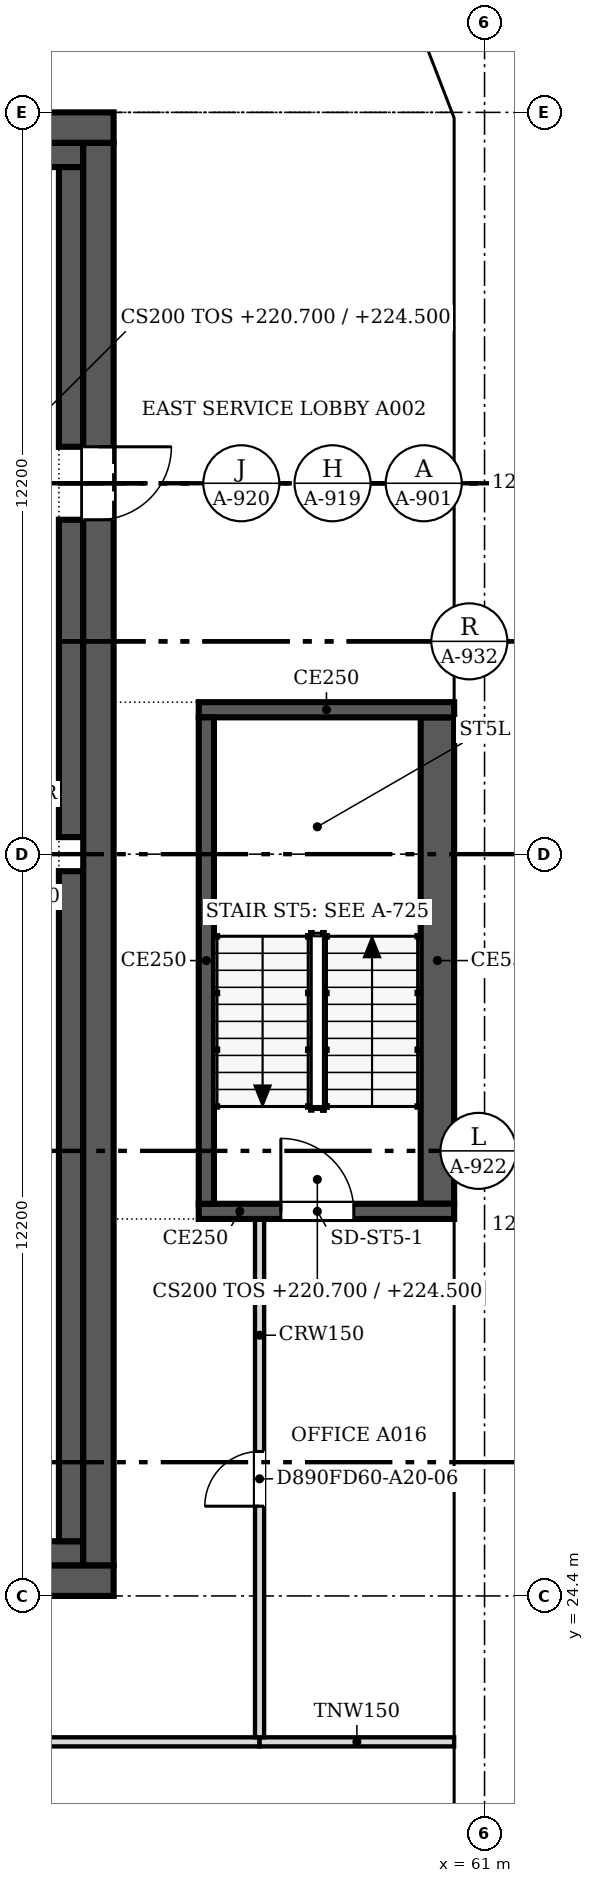
"""IFC4 building model, lengths in metres.
Left out: names, types, materials, properties, quantities, classifications, styles, units other than length and angle.
Written with IfcOpenShell. Run it as: python <this file> out.ifc"""

import sys

from ifc_helpers import new_model, si_unit, direction, frame, frame_2d, origin, place, context, subcontext, project, spatial, polyline, rectangle, outline, extrude, faceted_brep, source, transform, mapped, element, fill, save


model = new_model("IFC4")
c1 = context("Model", 3, precision=1e-05, world=origin(), true_north=direction((0.0, 1.0)))
c2 = subcontext(c1, "Body", "Model", "MODEL_VIEW")
j1 = project(units=[si_unit("LENGTHUNIT", "METRE"), si_unit("PLANEANGLEUNIT", "RADIAN")], contexts=[c1])
p1 = place(None, origin())
s1 = spatial("IfcSite", under=j1, at=p1, CompositionType="ELEMENT")
p2 = place(p1, origin())
s2 = spatial("IfcBuilding", under=s1, at=p2, CompositionType="ELEMENT")
p3 = place(p2, frame((0.0, 0.0, 220.7)))
s3 = spatial("IfcBuildingStorey", under=s2, at=p3, CompositionType="ELEMENT", Elevation=220.7)
m1 = source(origin(), c2, "Body", "Brep", [
    faceted_brep([(3.05, -0.25, 0.0), (6.1, -0.25, 3.8), (6.1, -0.25, 3.8), (3.05, -0.25, 7.6), (0.0, -0.25, 3.8), (0.0, 0.25, 3.8), (3.05, 0.25, 7.6), (6.1, 0.25, 3.8), (6.1, 0.25, 3.8), (3.05, 0.25, 0.0)], [[[0, 1, 2, 3, 4]], [[5, 6, 7, 8, 9]], [[9, 8, 1, 0]], [[7, 6, 3, 2]], [[6, 5, 4, 3]], [[5, 9, 0, 4]], [[1, 8, 7, 2]]]),
])
p4 = place(p3, frame((60.75, 18.3, -3.8), z_axis=(0.0, 0.0, 1.0), x_axis=(0.0, 1.0, 0.0)))
e1 = element("IfcWall", 1, at=p4, inside=s3, PredefinedType="SOLIDWALL", context=c2, shape_type="MappedRepresentation", body=[
    mapped(m1, transform((0.0, 0.0, 0.0), scale=1.0)),
])
m2 = source(origin(), c2, "Body", "SweptSolid", [
    extrude(outline(polyline([(3.05, 0.399), (5.78, 3.8), (3.05, 7.201), (0.321, 3.8), (3.05, 0.399)])), frame((0.0, 0.26, 0.0), z_axis=(0.0, -1.0, 0.0), x_axis=(1.0, 0.0, 0.0)), (0.0, 0.0, 1.0), 0.52),
])
p5 = place(p4, origin())
e2 = element("IfcOpeningElement", 2, at=p5, cuts=e1, PredefinedType="OPENING", context=c2, shape_type="MappedRepresentation", body=[
    mapped(m2, transform((0.0, 0.0, 0.0), scale=1.0)),
])
m3 = source(origin(), c2, "Body", "SweptSolid", [
    extrude(outline(polyline([(3.05, 0.0), (6.1, 3.8), (3.05, 7.6), (0.0, 3.8), (3.05, 0.0)])), frame((0.0, 0.25, 0.0), z_axis=(0.0, -1.0, 0.0), x_axis=(1.0, 0.0, 0.0)), (0.0, 0.0, 1.0), 0.5),
])
p6 = place(p3, frame((60.75, 24.4, -3.8), z_axis=(0.0, 0.0, 1.0), x_axis=(0.0, 1.0, 0.0)))
e3 = element("IfcWall", 3, at=p6, inside=s3, PredefinedType="SOLIDWALL", context=c2, shape_type="MappedRepresentation", body=[
    mapped(m3, transform((0.0, 0.0, 0.0), scale=1.0)),
])
p7 = place(p6, origin())
e4 = element("IfcOpeningElement", 4, at=p7, cuts=e3, PredefinedType="OPENING", context=c2, shape_type="MappedRepresentation", body=[
    mapped(m2, transform((0.0, 0.0, 0.0), scale=1.0)),
])
p8 = place(p3, frame((60.75, 30.5, -3.8), z_axis=(0.0, 0.0, 1.0), x_axis=(0.0, 1.0, 0.0)))
e5 = element("IfcWall", 5, at=p8, inside=s3, PredefinedType="SOLIDWALL", context=c2, shape_type="MappedRepresentation", body=[
    mapped(m3, transform((0.0, 0.0, 0.0), scale=1.0)),
])
p9 = place(p8, origin())
e6 = element("IfcOpeningElement", 6, at=p9, cuts=e5, PredefinedType="OPENING", context=c2, shape_type="MappedRepresentation", body=[
    mapped(m2, transform((0.0, 0.0, 0.0), scale=1.0)),
])
p10 = place(p3, frame((60.75, 36.6, -3.8), z_axis=(0.0, 0.0, 1.0), x_axis=(0.0, 1.0, 0.0)))
e7 = element("IfcWall", 7, at=p10, inside=s3, PredefinedType="SOLIDWALL", context=c2, shape_type="MappedRepresentation", body=[
    mapped(m1, transform((0.0, 0.0, 0.0), scale=1.0)),
])
p11 = place(p10, origin())
e8 = element("IfcOpeningElement", 8, at=p11, cuts=e7, PredefinedType="OPENING", context=c2, shape_type="MappedRepresentation", body=[
    mapped(m2, transform((0.0, 0.0, 0.0), scale=1.0)),
])
m4 = source(origin(), c2, "Body", "Brep", [
    faceted_brep([(3.05, -0.25, 0.0), (6.053, -0.25, 3.8), (3.05, -0.25, 7.6), (0.0, -0.25, 3.8), (0.0, 0.25, 3.8), (3.05, 0.25, 7.6), (6.007, 0.25, 3.859), (6.007, 0.25, 3.741), (3.05, 0.25, 0.0), (6.053, 0.0, 3.8)], [[[0, 1, 2, 3]], [[4, 5, 6, 7, 8]], [[8, 7, 9, 1, 0]], [[6, 5, 2, 1, 9]], [[5, 4, 3, 2]], [[4, 8, 0, 3]], [[9, 7, 6]]]),
])
p12 = place(p3, frame((60.75, 42.7, -3.8), z_axis=(0.0, 0.0, 1.0), x_axis=(0.0, 1.0, 0.0)))
e9 = element("IfcWall", 9, at=p12, inside=s3, PredefinedType="SOLIDWALL", context=c2, shape_type="MappedRepresentation", body=[
    mapped(m4, transform((0.0, 0.0, 0.0), scale=1.0)),
])
m5 = source(origin(), c2, "Body", "SweptSolid", [
    extrude(outline(polyline([(3.049, 0.401), (5.735, 3.8), (3.049, 7.199), (0.321, 3.8), (3.049, 0.401)])), frame((0.0, 0.26, 0.0), z_axis=(0.0, -1.0, 0.0), x_axis=(1.0, 0.0, 0.0)), (0.0, 0.0, 1.0), 0.52),
])
p13 = place(p12, origin())
e10 = element("IfcOpeningElement", 10, at=p13, cuts=e9, PredefinedType="OPENING", context=c2, shape_type="MappedRepresentation", body=[
    mapped(m5, transform((0.0, 0.0, 0.0), scale=1.0)),
])
m6 = source(origin(), c2, "Body", "Brep", [
    faceted_brep([(2.95, -0.25, 0.0), (3.003, -0.25, 0.068), (3.003, -0.25, 7.532), (2.95, -0.25, 7.6), (0.0, -0.25, 3.8), (0.047, 0.25, 3.86), (2.898, 0.25, 7.532), (2.898, 0.25, 0.068), (0.047, 0.25, 3.74), (2.95, 0.0, 0.0), (2.95, 0.0, 7.6), (0.0, 0.0, 3.8)], [[[0, 1, 2, 3, 4]], [[5, 6, 7, 8]], [[1, 0, 9]], [[10, 3, 2]], [[6, 5, 11, 4, 3, 10]], [[8, 7, 9, 0, 4, 11]], [[8, 11, 5]], [[1, 9, 7, 6, 10, 2]]]),
])
p14 = place(p3, frame((60.75, 48.753, -3.8), z_axis=(0.0, 0.0, 1.0), x_axis=(-0.35992665181, 0.932980602862, 0.0)))
e11 = element("IfcWall", 11, at=p14, inside=s3, PredefinedType="SOLIDWALL", context=c2, shape_type="MappedRepresentation", body=[
    mapped(m6, transform((0.0, 0.0, 0.0), scale=1.0)),
])
m7 = source(origin(), c2, "Body", "SweptSolid", [
    extrude(outline(polyline([(2.75, 6.935), (0.316, 3.8), (2.75, 0.665), (2.75, 6.935)])), frame((0.0, 0.26, 0.0), z_axis=(0.0, -1.0, 0.0), x_axis=(1.0, 0.0, 0.0)), (0.0, 0.0, 1.0), 0.52),
])
p15 = place(p14, origin())
e12 = element("IfcOpeningElement", 12, at=p15, cuts=e11, PredefinedType="OPENING", context=c2, shape_type="MappedRepresentation", body=[
    mapped(m7, transform((0.0, 0.0, 0.0), scale=1.0)),
])
p16 = place(p2, frame((0.0, 0.0, 224.5)))
s4 = spatial("IfcBuildingStorey", under=s2, at=p16, CompositionType="ELEMENT", Elevation=224.5)
p17 = place(p16, frame((60.75, 15.25, -3.8), z_axis=(0.0, 0.0, 1.0), x_axis=(0.0, 1.0, 0.0)))
e13 = element("IfcWall", 13, at=p17, inside=s4, PredefinedType="SOLIDWALL", context=c2, shape_type="MappedRepresentation", body=[
    mapped(m3, transform((0.0, 0.0, 0.0), scale=1.0)),
])
p18 = place(p17, origin())
e14 = element("IfcOpeningElement", 14, at=p18, cuts=e13, PredefinedType="OPENING", context=c2, shape_type="MappedRepresentation", body=[
    mapped(m2, transform((0.0, 0.0, 0.0), scale=1.0)),
])
p19 = place(p16, frame((60.75, 21.35, -3.8), z_axis=(0.0, 0.0, 1.0), x_axis=(0.0, 1.0, 0.0)))
e15 = element("IfcWall", 15, at=p19, inside=s4, PredefinedType="SOLIDWALL", context=c2, shape_type="MappedRepresentation", body=[
    mapped(m1, transform((0.0, 0.0, 0.0), scale=1.0)),
])
p20 = place(p19, origin())
e16 = element("IfcOpeningElement", 16, at=p20, cuts=e15, PredefinedType="OPENING", context=c2, shape_type="MappedRepresentation", body=[
    mapped(m2, transform((0.0, 0.0, 0.0), scale=1.0)),
])
p21 = place(p16, frame((60.75, 27.45, -3.8), z_axis=(0.0, 0.0, 1.0), x_axis=(0.0, 1.0, 0.0)))
e17 = element("IfcWall", 17, at=p21, inside=s4, PredefinedType="SOLIDWALL", context=c2, shape_type="MappedRepresentation", body=[
    mapped(m3, transform((0.0, 0.0, 0.0), scale=1.0)),
])
p22 = place(p21, origin())
e18 = element("IfcOpeningElement", 18, at=p22, cuts=e17, PredefinedType="OPENING", context=c2, shape_type="MappedRepresentation", body=[
    mapped(m2, transform((0.0, 0.0, 0.0), scale=1.0)),
])
p23 = place(p16, frame((60.75, 33.55, -3.8), z_axis=(0.0, 0.0, 1.0), x_axis=(0.0, 1.0, 0.0)))
e19 = element("IfcWall", 19, at=p23, inside=s4, PredefinedType="SOLIDWALL", context=c2, shape_type="MappedRepresentation", body=[
    mapped(m1, transform((0.0, 0.0, 0.0), scale=1.0)),
])
p24 = place(p23, origin())
e20 = element("IfcOpeningElement", 20, at=p24, cuts=e19, PredefinedType="OPENING", context=c2, shape_type="MappedRepresentation", body=[
    mapped(m2, transform((0.0, 0.0, 0.0), scale=1.0)),
])
p25 = place(p16, frame((60.75, 39.65, -3.8), z_axis=(0.0, 0.0, 1.0), x_axis=(0.0, 1.0, 0.0)))
e21 = element("IfcWall", 21, at=p25, inside=s4, PredefinedType="SOLIDWALL", context=c2, shape_type="MappedRepresentation", body=[
    mapped(m3, transform((0.0, 0.0, 0.0), scale=1.0)),
])
p26 = place(p25, origin())
e22 = element("IfcOpeningElement", 22, at=p26, cuts=e21, PredefinedType="OPENING", context=c2, shape_type="MappedRepresentation", body=[
    mapped(m2, transform((0.0, 0.0, 0.0), scale=1.0)),
])
m8 = source(origin(), c2, "Body", "Brep", [
    faceted_brep([(3.003, -0.25, 0.0), (3.05, -0.25, 0.06), (3.05, -0.25, 7.54), (3.003, -0.25, 7.6), (0.0, -0.25, 3.8), (0.0, 0.25, 3.8), (2.957, 0.25, 7.541), (2.957, 0.25, 0.059), (3.003, 0.0, 0.0), (3.003, 0.0, 7.6)], [[[0, 1, 2, 3, 4]], [[5, 6, 7]], [[1, 0, 8]], [[9, 3, 2]], [[6, 5, 4, 3, 9]], [[5, 7, 8, 0, 4]], [[1, 8, 7, 6, 9, 2]]]),
])
p27 = place(p16, frame((60.75, 45.75, -3.8), z_axis=(0.0, 0.0, 1.0), x_axis=(0.0, 1.0, 0.0)))
e23 = element("IfcWall", 23, at=p27, inside=s4, PredefinedType="SOLIDWALL", context=c2, shape_type="MappedRepresentation", body=[
    mapped(m8, transform((0.0, 0.0, 0.0), scale=1.0)),
])
m9 = source(origin(), c2, "Body", "SweptSolid", [
    extrude(outline(polyline([(2.803, 6.944), (0.319, 3.8), (2.803, 0.656), (2.803, 6.944)])), frame((0.0, 0.26, 0.0), z_axis=(0.0, -1.0, 0.0), x_axis=(1.0, 0.0, 0.0)), (0.0, 0.0, 1.0), 0.52),
])
p28 = place(p27, origin())
e24 = element("IfcOpeningElement", 24, at=p28, cuts=e23, PredefinedType="OPENING", context=c2, shape_type="MappedRepresentation", body=[
    mapped(m9, transform((0.0, 0.0, 0.0), scale=1.0)),
])
m10 = source(origin(), c2, "Body", "Brep", [
    faceted_brep([(0.047, -0.25, 0.0), (2.997, -0.25, 3.8), (0.047, -0.25, 7.6), (0.0, -0.25, 7.541), (0.0, -0.25, 0.059), (0.093, 0.25, 7.54), (2.944, 0.25, 3.868), (2.944, 0.25, 3.732), (0.093, 0.25, 0.06), (2.997, 0.0, 3.8), (0.047, 0.0, 0.0), (0.047, 0.0, 7.6)], [[[0, 1, 2, 3, 4]], [[5, 6, 7, 8]], [[8, 7, 9, 1, 0, 10]], [[6, 5, 11, 2, 1, 9]], [[3, 2, 11]], [[10, 0, 4]], [[8, 10, 4, 3, 11, 5]], [[9, 7, 6]]]),
])
p29 = place(p16, frame((60.767, 48.71, -3.8), z_axis=(0.0, 0.0, 1.0), x_axis=(-0.359901446078, 0.932990326376, 0.0)))
e25 = element("IfcWall", 25, at=p29, inside=s4, PredefinedType="SOLIDWALL", context=c2, shape_type="MappedRepresentation", body=[
    mapped(m10, transform((0.0, 0.0, 0.0), scale=1.0)),
])
m11 = source(origin(), c2, "Body", "SweptSolid", [
    extrude(outline(polyline([(0.247, 0.665), (2.681, 3.8), (0.247, 6.935), (0.247, 0.665)])), frame((0.0, 0.26, 0.0), z_axis=(0.0, -1.0, 0.0), x_axis=(1.0, 0.0, 0.0)), (0.0, 0.0, 1.0), 0.52),
])
p30 = place(p29, origin())
e26 = element("IfcOpeningElement", 26, at=p30, cuts=e25, PredefinedType="OPENING", context=c2, shape_type="MappedRepresentation", body=[
    mapped(m11, transform((0.0, 0.0, 0.0), scale=1.0)),
])
p31 = place(p3, frame((54.9, 24.65, 0.0), z_axis=(0.0, 0.0, 1.0), x_axis=(-1.0, 0.0, 0.0)))
e27 = element("IfcWall", 27, at=p31, inside=s3, PredefinedType="SHEAR", context=c2, shape_type="SweptSolid", body=[
    extrude(rectangle(XDim=24.4, YDim=0.5, at=frame_2d((12.2, 0.0))), origin(), (0.0, 0.0, 1.0), 3.8),
])
m12 = source(origin(), c2, "Body", "SweptSolid", [
    extrude(rectangle(XDim=1.2, YDim=2.1, at=frame_2d((0.6, 1.05))), frame((0.0, 0.26, 0.0), z_axis=(0.0, -1.0, 0.0), x_axis=(1.0, 0.0, 0.0)), (0.0, 0.0, 1.0), 0.52),
])
p32 = place(p31, frame((1.5, 0.0, 0.0)))
e28 = element("IfcOpeningElement", 28, at=p32, cuts=e27, PredefinedType="OPENING", context=c2, shape_type="MappedRepresentation", body=[
    mapped(m12, transform((0.0, 0.0, 0.0), scale=1.0)),
])
p33 = place(p3, frame((30.5, 48.55, 0.0), z_axis=(0.0, 0.0, 1.0), x_axis=(1.0, 0.0, 0.0)))
e29 = element("IfcWall", 29, at=p33, inside=s3, PredefinedType="SHEAR", context=c2, shape_type="SweptSolid", body=[
    extrude(rectangle(XDim=24.4, YDim=0.5, at=frame_2d((12.2, 0.0))), origin(), (0.0, 0.0, 1.0), 3.8),
])
p34 = place(p3, frame((54.65, 48.3, 0.0), z_axis=(0.0, 0.0, 1.0), x_axis=(0.0, -1.0, 0.0)))
e30 = element("IfcWall", 30, at=p34, inside=s3, PredefinedType="SHEAR", context=c2, shape_type="SweptSolid", body=[
    extrude(rectangle(XDim=23.4, YDim=0.5, at=frame_2d((11.7, 0.0))), origin(), (0.0, 0.0, 1.0), 3.8),
])
p35 = place(p34, frame((5.0, 0.0, 0.0)))
e31 = element("IfcOpeningElement", 31, at=p35, cuts=e30, PredefinedType="OPENING", context=c2, shape_type="MappedRepresentation", body=[
    mapped(m12, transform((0.0, 0.0, 0.0), scale=1.0)),
])
p36 = place(p3, frame((53.4, 25.1, 0.0), z_axis=(0.0, 0.0, 1.0), x_axis=(1.0, 0.0, 0.0)))
e32 = element("IfcWall", 32, at=p36, inside=s3, PredefinedType="SOLIDWALL", context=c2, shape_type="SweptSolid", body=[
    extrude(rectangle(XDim=1.0, YDim=0.4, at=frame_2d((0.5, 0.0))), origin(), (0.0, 0.0, 1.0), 3.8),
])
p37 = place(p3, frame((31.0, 48.1, 0.0), z_axis=(0.0, 0.0, 1.0), x_axis=(1.0, 0.0, 0.0)))
e33 = element("IfcWall", 33, at=p37, inside=s3, PredefinedType="SOLIDWALL", context=c2, shape_type="SweptSolid", body=[
    extrude(rectangle(XDim=23.4, YDim=0.4, at=frame_2d((11.7, 0.0))), origin(), (0.0, 0.0, 1.0), 3.8),
])
p38 = place(p3, frame((54.2, 25.3, 0.0), z_axis=(0.0, 0.0, 1.0), x_axis=(0.0, 1.0, 0.0)))
e34 = element("IfcWall", 34, at=p38, inside=s3, PredefinedType="SOLIDWALL", context=c2, shape_type="SweptSolid", body=[
    extrude(rectangle(XDim=11.02, YDim=0.4, at=frame_2d((5.51, 0.0))), origin(), (0.0, 0.0, 1.0), 3.8),
])
p39 = place(p3, frame((54.2, 36.88, 0.0), z_axis=(0.0, 0.0, 1.0), x_axis=(0.0, 1.0, 0.0)))
e35 = element("IfcWall", 35, at=p39, inside=s3, PredefinedType="SOLIDWALL", context=c2, shape_type="SweptSolid", body=[
    extrude(rectangle(XDim=5.22, YDim=0.4, at=frame_2d((2.61, 0.0))), origin(), (0.0, 0.0, 1.0), 3.8),
])
p40 = place(p3, frame((54.2, 43.3, 0.0), z_axis=(0.0, 0.0, 1.0), x_axis=(0.0, 1.0, 0.0)))
e36 = element("IfcWall", 36, at=p40, inside=s3, PredefinedType="SOLIDWALL", context=c2, shape_type="SweptSolid", body=[
    extrude(rectangle(XDim=4.6, YDim=0.4, at=frame_2d((2.3, 0.0))), origin(), (0.0, 0.0, 1.0), 3.8),
])
p41 = place(p3, frame((60.5, 30.725, 0.0), z_axis=(0.0, 0.0, 1.0), x_axis=(-1.0, 0.0, 0.0)))
e37 = element("IfcWall", 37, at=p41, inside=s3, PredefinedType="SOLIDWALL", context=c2, shape_type="SweptSolid", body=[
    extrude(rectangle(XDim=4.2, YDim=0.25, at=frame_2d((2.1, 0.0))), origin(), (0.0, 0.0, 1.0), 3.8),
])
m13 = source(origin(), c2, "Body", "SweptSolid", [
    extrude(rectangle(XDim=1.2, YDim=2.1, at=frame_2d((0.6, 1.05))), frame((0.0, 0.135, 0.0), z_axis=(0.0, -1.0, 0.0), x_axis=(1.0, 0.0, 0.0)), (0.0, 0.0, 1.0), 0.27),
])
p42 = place(p41, frame((1.65, 0.0, 0.0)))
e38 = element("IfcOpeningElement", 38, at=p42, cuts=e37, PredefinedType="OPENING", context=c2, shape_type="MappedRepresentation", body=[
    mapped(m13, transform((0.0, 0.0, 0.0), scale=1.0)),
])
p43 = place(p3, frame((56.425, 30.85, 0.0), z_axis=(0.0, 0.0, 1.0), x_axis=(0.0, 1.0, 0.0)))
e39 = element("IfcWall", 39, at=p43, inside=s3, PredefinedType="SOLIDWALL", context=c2, shape_type="SweptSolid", body=[
    extrude(rectangle(XDim=8.0, YDim=0.25, at=frame_2d((4.0, 0.0))), origin(), (0.0, 0.0, 1.0), 3.8),
])
p44 = place(p3, frame((56.3, 38.975, 0.0), z_axis=(0.0, 0.0, 1.0), x_axis=(1.0, 0.0, 0.0)))
e40 = element("IfcWall", 40, at=p44, inside=s3, PredefinedType="SOLIDWALL", context=c2, shape_type="SweptSolid", body=[
    extrude(rectangle(XDim=4.2, YDim=0.25, at=frame_2d((2.1, 0.0))), origin(), (0.0, 0.0, 1.0), 3.8),
])
p45 = place(p3, frame((60.225, 38.85, 0.0), z_axis=(0.0, 0.0, 1.0), x_axis=(0.0, -1.0, 0.0)))
e41 = element("IfcWall", 41, at=p45, inside=s3, PredefinedType="SOLIDWALL", context=c2, shape_type="SweptSolid", body=[
    extrude(rectangle(XDim=8.0, YDim=0.55, at=frame_2d((4.0, 0.0))), origin(), (0.0, 0.0, 1.0), 3.8),
])
p46 = place(p3, frame((45.4, 22.0, 0.0), z_axis=(0.0, 0.0, 1.0), x_axis=(1.0, 0.0, 0.0)))
e42 = element("IfcWall", 42, at=p46, inside=s3, PredefinedType="PARTITIONING", context=c2, shape_type="SweptSolid", body=[
    extrude(rectangle(XDim=11.9, YDim=0.15, at=frame_2d((5.95, 0.0))), origin(), (0.0, 0.0, 1.0), 3.067),
])
p47 = place(p3, frame((57.301, 22.0, 0.0), z_axis=(0.0, 0.0, 1.0), x_axis=(1.0, 0.0, 0.0)))
e43 = element("IfcWall", 43, at=p47, inside=s3, PredefinedType="PARTITIONING", context=c2, shape_type="SweptSolid", body=[
    extrude(rectangle(XDim=3.199, YDim=0.15, at=frame_2d((1.6, 0.0))), origin(), (0.0, 0.0, 1.0), 3.067),
])
p48 = place(p3, frame((57.3, 30.6, 0.0), z_axis=(0.0, 0.0, 1.0), x_axis=(0.0, -1.0, 0.0)))
e44 = element("IfcWall", 44, at=p48, inside=s3, PredefinedType="PARTITIONING", context=c2, shape_type="SweptSolid", body=[
    extrude(rectangle(XDim=8.524, YDim=0.15, at=frame_2d((4.262, 0.0))), origin(), (0.0, 0.0, 1.0), 3.067),
])
m14 = source(origin(), c2, "Body", "SweptSolid", [
    extrude(rectangle(XDim=0.9, YDim=2.1, at=frame_2d((0.45, 1.05))), frame((0.0, 0.085, 0.0), z_axis=(0.0, -1.0, 0.0), x_axis=(1.0, 0.0, 0.0)), (0.0, 0.0, 1.0), 0.17),
])
p49 = place(p48, frame((3.824, 0.0, 0.0)))
e45 = element("IfcOpeningElement", 45, at=p49, cuts=e44, PredefinedType="OPENING", context=c2, shape_type="MappedRepresentation", body=[
    mapped(m14, transform((0.0, 0.0, 0.0), scale=1.0)),
])
m15 = source(origin(), c2, "Body", "SweptSolid", [
    extrude(rectangle(XDim=1.2, YDim=2.1, at=frame_2d((0.6, 1.05))), frame((0.0, 0.025, 0.0), z_axis=(0.0, -1.0, 0.0), x_axis=(1.0, 0.0, 0.0)), (0.0, 0.0, 1.0), 0.05),
])
p50 = place(p35, origin())
e46 = element("IfcDoor", 46, at=p50, inside=s3, OperationType="SINGLE_SWING_LEFT", PredefinedType="DOOR", context=c2, shape_type="MappedRepresentation", body=[
    mapped(m15, transform((0.0, 0.0, 0.0), scale=1.0)),
])
fill(e31, e46)
p51 = place(p42, origin())
e47 = element("IfcDoor", 47, at=p51, inside=s3, OperationType="SINGLE_SWING_RIGHT", PredefinedType="DOOR", context=c2, shape_type="MappedRepresentation", body=[
    mapped(m15, transform((0.0, 0.0, 0.0), scale=1.0)),
])
fill(e38, e47)
m16 = source(origin(), c2, "Body", "SweptSolid", [
    extrude(rectangle(XDim=0.9, YDim=2.1, at=frame_2d((0.45, 1.05))), frame((0.0, 0.025, 0.0), z_axis=(0.0, -1.0, 0.0), x_axis=(1.0, 0.0, 0.0)), (0.0, 0.0, 1.0), 0.05),
])
p52 = place(p49, origin())
e48 = element("IfcDoor", 48, at=p52, inside=s3, OperationType="SINGLE_SWING_RIGHT", PredefinedType="DOOR", context=c2, shape_type="MappedRepresentation", body=[
    mapped(m16, transform((0.0, 0.0, 0.0), scale=1.0)),
])
fill(e45, e48)
save(model, sys.argv[1])
